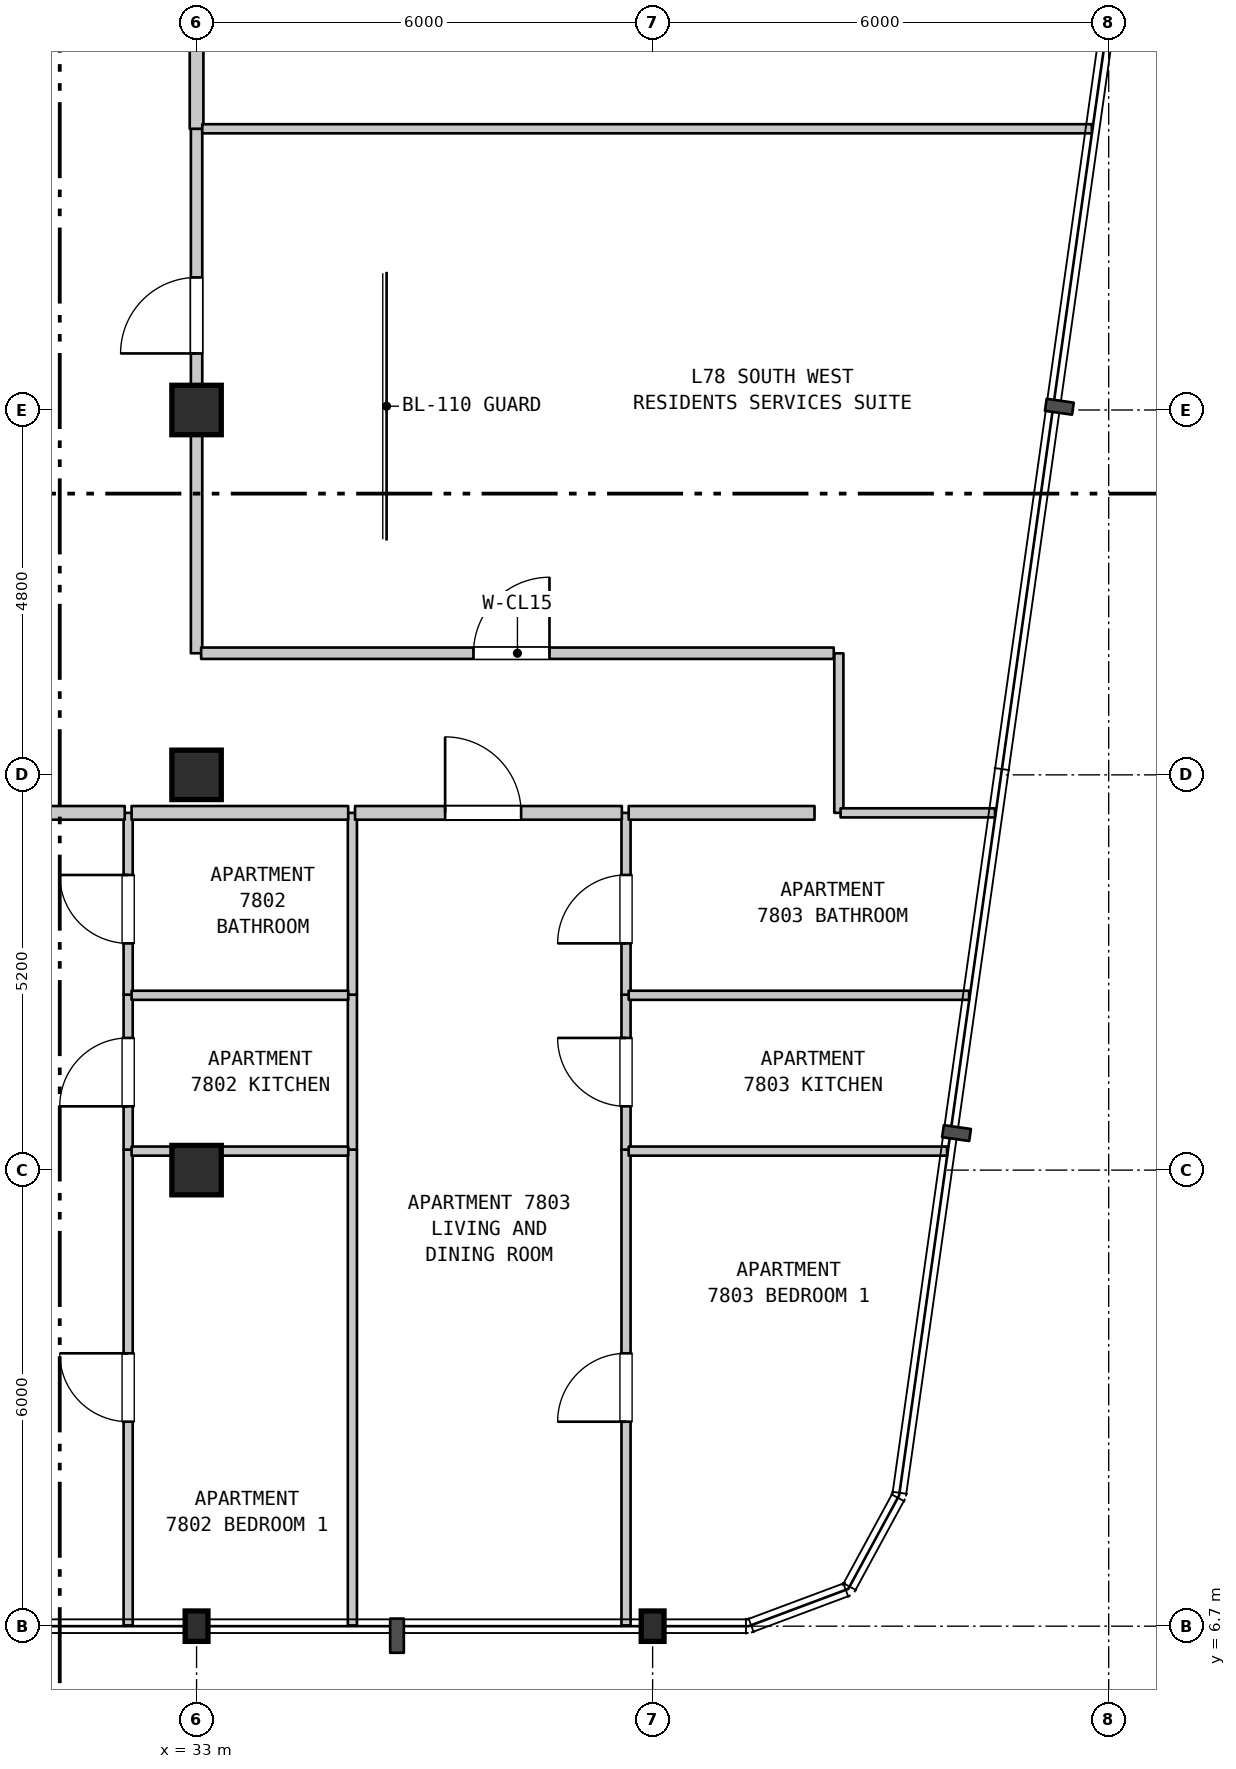
"""IFC4 building model, lengths in metres.
Left out: names, types, materials, properties, quantities, classifications, styles, units other than length and angle.
Written with IfcOpenShell. Run it as: python <this file> out.ifc"""

import sys

from ifc_helpers import new_model, si_unit, direction, frame, frame_2d, origin, origin_2d, place, context, subcontext, project, spatial, rectangle, i_section, extrude, element, fill, save


model = new_model("IFC4")
c1 = context("Model", 3, precision=1e-05, world=origin(), true_north=direction((0.0, 1.0)))
c2 = subcontext(c1, "Body", "Model", "MODEL_VIEW")
j1 = project(units=[si_unit("LENGTHUNIT", "METRE"), si_unit("PLANEANGLEUNIT", "RADIAN")], contexts=[c1])
p1 = place(None, origin())
s1 = spatial("IfcSite", under=j1, at=p1, CompositionType="ELEMENT")
p2 = place(p1, origin())
s2 = spatial("IfcBuilding", under=s1, at=p2, CompositionType="ELEMENT")
p3 = place(p2, frame((0.0, 0.0, 311.0)))
s3 = spatial("IfcBuildingStorey", under=s2, at=p3, CompositionType="ELEMENT", Elevation=311.0)
p4 = place(p3, frame((33.0, 6.7, 0.0), z_axis=(0.0, 0.0, 1.0), x_axis=(1.0, 0.0, 0.0)))
e1 = element("IfcColumn", 1, at=p4, inside=s3, PredefinedType="COLUMN", context=c2, shape_type="SweptSolid", body=[
    extrude(i_section(OverallWidth=0.3, OverallDepth=0.4, WebThickness=0.013, FlangeThickness=0.024, FilletRadius=0.027, at=origin_2d()), origin(), (0.0, 0.0, 1.0), 3.7),
])
for number, where, z_axis, x_axis in (
    (2, (33.0, 12.7, 0.0), (0.0, 0.0, 1.0), (1.0, 0.0, 0.0)),
    (3, (33.0, 17.9, 0.0), (0.0, 0.0, 1.0), (1.0, 0.0, 0.0)),
    (4, (33.0, 22.7, 0.0), (0.0, 0.0, 1.0), (1.0, 0.0, 0.0)),
):
    element("IfcColumn", number, at=place(p3, frame(where, z_axis=z_axis, x_axis=x_axis)), inside=s3, PredefinedType="COLUMN", context=c2, shape_type="SweptSolid", body=[
        extrude(rectangle(XDim=0.65, YDim=0.65, at=origin_2d()), origin(), (0.0, 0.0, 1.0), 3.7),
    ])
p5 = place(p3, frame((39.0, 6.7, 0.0), z_axis=(0.0, 0.0, 1.0), x_axis=(1.0, 0.0, 0.0)))
e5 = element("IfcColumn", 5, at=p5, inside=s3, PredefinedType="COLUMN", context=c2, shape_type="SweptSolid", body=[
    extrude(i_section(OverallWidth=0.3, OverallDepth=0.4, WebThickness=0.013, FlangeThickness=0.024, FilletRadius=0.027, at=origin_2d()), origin(), (0.0, 0.0, 1.0), 3.7),
])
p6 = place(p3, frame((32.1, 6.71, 0.0), z_axis=(0.0, 0.0, 1.0), x_axis=(0.0, 1.0, 0.0)))
e6 = element("IfcWall", 6, at=p6, inside=s3, PredefinedType="PARTITIONING", context=c2, shape_type="SweptSolid", body=[
    extrude(rectangle(XDim=6.26, YDim=0.12, at=frame_2d((3.13, 0.0))), origin(), (0.0, 0.0, 1.0), 3.28),
])
p7 = place(p6, frame((2.68, 0.0, 0.0)))
e7 = element("IfcOpeningElement", 7, at=p7, cuts=e6, PredefinedType="OPENING", context=c2, shape_type="SweptSolid", body=[
    extrude(rectangle(XDim=0.9, YDim=2.15, at=frame_2d((0.45, 1.075))), frame((0.0, 0.07, 0.0), z_axis=(0.0, -1.0, 0.0), x_axis=(1.0, 0.0, 0.0)), (0.0, 0.0, 1.0), 0.14),
])
p8 = place(p3, frame((32.1, 12.97, 0.0), z_axis=(0.0, 0.0, 1.0), x_axis=(0.0, 1.0, 0.0)))
e8 = element("IfcWall", 8, at=p8, inside=s3, PredefinedType="PARTITIONING", context=c2, shape_type="SweptSolid", body=[
    extrude(rectangle(XDim=2.038, YDim=0.12, at=frame_2d((1.019, 0.0))), origin(), (0.0, 0.0, 1.0), 3.28),
])
p9 = place(p8, frame((0.569, 0.0, 0.0)))
e9 = element("IfcOpeningElement", 9, at=p9, cuts=e8, PredefinedType="OPENING", context=c2, shape_type="SweptSolid", body=[
    extrude(rectangle(XDim=0.9, YDim=2.15, at=frame_2d((0.45, 1.075))), frame((0.0, 0.07, 0.0), z_axis=(0.0, -1.0, 0.0), x_axis=(1.0, 0.0, 0.0)), (0.0, 0.0, 1.0), 0.14),
])
p10 = place(p3, frame((32.1, 15.008, 0.0), z_axis=(0.0, 0.0, 1.0), x_axis=(0.0, 1.0, 0.0)))
e10 = element("IfcWall", 10, at=p10, inside=s3, PredefinedType="PARTITIONING", context=c2, shape_type="SweptSolid", body=[
    extrude(rectangle(XDim=2.392, YDim=0.12, at=frame_2d((1.196, 0.0))), origin(), (0.0, 0.0, 1.0), 3.28),
])
p11 = place(p10, frame((0.675, 0.0, 0.0)))
e11 = element("IfcOpeningElement", 11, at=p11, cuts=e10, PredefinedType="OPENING", context=c2, shape_type="SweptSolid", body=[
    extrude(rectangle(XDim=0.9, YDim=2.1, at=frame_2d((0.45, 1.05))), frame((0.0, 0.07, 0.0), z_axis=(0.0, -1.0, 0.0), x_axis=(1.0, 0.0, 0.0)), (0.0, 0.0, 1.0), 0.14),
])
p12 = place(p3, frame((33.0, 19.5, 0.0), z_axis=(0.0, 0.0, 1.0), x_axis=(0.0, 1.0, 0.0)))
e12 = element("IfcWall", 12, at=p12, inside=s3, PredefinedType="STANDARD", context=c2, shape_type="SweptSolid", body=[
    extrude(rectangle(XDim=6.9, YDim=0.15, at=frame_2d((3.45, 0.0))), origin(), (0.0, 0.0, 1.0), 2.99),
])
p13 = place(p12, frame((3.944, 0.0, 0.0)))
e13 = element("IfcOpeningElement", 13, at=p13, cuts=e12, PredefinedType="OPENING", context=c2, shape_type="SweptSolid", body=[
    extrude(rectangle(XDim=1.0, YDim=2.15, at=frame_2d((0.5, 1.075))), frame((0.0, 0.085, 0.0), z_axis=(0.0, -1.0, 0.0), x_axis=(1.0, 0.0, 0.0)), (0.0, 0.0, 1.0), 0.17),
])
p14 = place(p3, frame((33.0, 26.4, 0.0), z_axis=(0.0, 0.0, 1.0), x_axis=(0.0, 1.0, 0.0)))
e14 = element("IfcWall", 14, at=p14, inside=s3, PredefinedType="STANDARD", context=c2, shape_type="SweptSolid", body=[
    extrude(rectangle(XDim=1.5, YDim=0.18, at=frame_2d((0.75, 0.0))), origin(), (0.0, 0.0, 1.0), 2.99),
])
p15 = place(p3, frame((35.05, 6.71, 0.0), z_axis=(0.0, 0.0, 1.0), x_axis=(0.0, 1.0, 0.0)))
e15 = element("IfcWall", 15, at=p15, inside=s3, PredefinedType="PARTITIONING", context=c2, shape_type="SweptSolid", body=[
    extrude(rectangle(XDim=6.26, YDim=0.12, at=frame_2d((3.13, 0.0))), origin(), (0.0, 0.0, 1.0), 3.28),
])
p16 = place(p3, frame((35.05, 12.97, 0.0), z_axis=(0.0, 0.0, 1.0), x_axis=(0.0, 1.0, 0.0)))
e16 = element("IfcWall", 16, at=p16, inside=s3, PredefinedType="PARTITIONING", context=c2, shape_type="SweptSolid", body=[
    extrude(rectangle(XDim=2.038, YDim=0.12, at=frame_2d((1.019, 0.0))), origin(), (0.0, 0.0, 1.0), 3.28),
])
p17 = place(p3, frame((35.05, 15.008, 0.0), z_axis=(0.0, 0.0, 1.0), x_axis=(0.0, 1.0, 0.0)))
e17 = element("IfcWall", 17, at=p17, inside=s3, PredefinedType="PARTITIONING", context=c2, shape_type="SweptSolid", body=[
    extrude(rectangle(XDim=2.392, YDim=0.12, at=frame_2d((1.196, 0.0))), origin(), (0.0, 0.0, 1.0), 3.28),
])
p18 = place(p3, frame((38.65, 6.71, 0.0), z_axis=(0.0, 0.0, 1.0), x_axis=(0.0, 1.0, 0.0)))
e18 = element("IfcWall", 18, at=p18, inside=s3, PredefinedType="PARTITIONING", context=c2, shape_type="SweptSolid", body=[
    extrude(rectangle(XDim=6.26, YDim=0.12, at=frame_2d((3.13, 0.0))), origin(), (0.0, 0.0, 1.0), 3.28),
])
p19 = place(p18, frame((2.68, 0.0, 0.0)))
e19 = element("IfcOpeningElement", 19, at=p19, cuts=e18, PredefinedType="OPENING", context=c2, shape_type="SweptSolid", body=[
    extrude(rectangle(XDim=0.9, YDim=2.15, at=frame_2d((0.45, 1.075))), frame((0.0, 0.07, 0.0), z_axis=(0.0, -1.0, 0.0), x_axis=(1.0, 0.0, 0.0)), (0.0, 0.0, 1.0), 0.14),
])
p20 = place(p3, frame((38.65, 12.97, 0.0), z_axis=(0.0, 0.0, 1.0), x_axis=(0.0, 1.0, 0.0)))
e20 = element("IfcWall", 20, at=p20, inside=s3, PredefinedType="PARTITIONING", context=c2, shape_type="SweptSolid", body=[
    extrude(rectangle(XDim=2.038, YDim=0.12, at=frame_2d((1.019, 0.0))), origin(), (0.0, 0.0, 1.0), 3.28),
])
p21 = place(p20, frame((0.569, 0.0, 0.0)))
e21 = element("IfcOpeningElement", 21, at=p21, cuts=e20, PredefinedType="OPENING", context=c2, shape_type="SweptSolid", body=[
    extrude(rectangle(XDim=0.9, YDim=2.15, at=frame_2d((0.45, 1.075))), frame((0.0, 0.07, 0.0), z_axis=(0.0, -1.0, 0.0), x_axis=(1.0, 0.0, 0.0)), (0.0, 0.0, 1.0), 0.14),
])
p22 = place(p3, frame((38.65, 15.008, 0.0), z_axis=(0.0, 0.0, 1.0), x_axis=(0.0, 1.0, 0.0)))
e22 = element("IfcWall", 22, at=p22, inside=s3, PredefinedType="PARTITIONING", context=c2, shape_type="SweptSolid", body=[
    extrude(rectangle(XDim=2.392, YDim=0.12, at=frame_2d((1.196, 0.0))), origin(), (0.0, 0.0, 1.0), 3.28),
])
p23 = place(p22, frame((0.675, 0.0, 0.0)))
e23 = element("IfcOpeningElement", 23, at=p23, cuts=e22, PredefinedType="OPENING", context=c2, shape_type="SweptSolid", body=[
    extrude(rectangle(XDim=0.9, YDim=2.1, at=frame_2d((0.45, 1.05))), frame((0.0, 0.07, 0.0), z_axis=(0.0, -1.0, 0.0), x_axis=(1.0, 0.0, 0.0)), (0.0, 0.0, 1.0), 0.14),
])
p24 = place(p3, frame((41.45, 17.4, 0.0), z_axis=(0.0, 0.0, 1.0), x_axis=(0.0, 1.0, 0.0)))
e24 = element("IfcWall", 24, at=p24, inside=s3, PredefinedType="PARTITIONING", context=c2, shape_type="SweptSolid", body=[
    extrude(rectangle(XDim=2.099, YDim=0.12, at=frame_2d((1.05, 0.0))), origin(), (0.0, 0.0, 1.0), 3.28),
])
p25 = place(p3, frame((32.145, 12.95, 0.0), z_axis=(0.0, 0.0, 1.0), x_axis=(1.0, 0.0, 0.0)))
e25 = element("IfcWall", 25, at=p25, inside=s3, PredefinedType="PARTITIONING", context=c2, shape_type="SweptSolid", body=[
    extrude(rectangle(XDim=2.85, YDim=0.12, at=frame_2d((1.425, 0.0))), origin(), (0.0, 0.0, 1.0), 3.28),
])
p26 = place(p3, frame((38.685, 12.95, 0.0), z_axis=(0.0, 0.0, 1.0), x_axis=(1.0, 0.0, 0.0)))
e26 = element("IfcWall", 26, at=p26, inside=s3, PredefinedType="PARTITIONING", context=c2, shape_type="SweptSolid", body=[
    extrude(rectangle(XDim=4.189, YDim=0.12, at=frame_2d((2.094, 0.0))), origin(), (0.0, 0.0, 1.0), 3.28),
])
p27 = place(p3, frame((32.145, 15.0, 0.0), z_axis=(0.0, 0.0, 1.0), x_axis=(1.0, 0.0, 0.0)))
e27 = element("IfcWall", 27, at=p27, inside=s3, PredefinedType="PARTITIONING", context=c2, shape_type="SweptSolid", body=[
    extrude(rectangle(XDim=2.85, YDim=0.12, at=frame_2d((1.425, 0.0))), origin(), (0.0, 0.0, 1.0), 3.28),
])
p28 = place(p3, frame((38.685, 15.0, 0.0), z_axis=(0.0, 0.0, 1.0), x_axis=(1.0, 0.0, 0.0)))
e28 = element("IfcWall", 28, at=p28, inside=s3, PredefinedType="PARTITIONING", context=c2, shape_type="SweptSolid", body=[
    extrude(rectangle(XDim=4.479, YDim=0.12, at=frame_2d((2.24, 0.0))), origin(), (0.0, 0.0, 1.0), 3.28),
])
p29 = place(p3, frame((28.545, 17.4, 0.0), z_axis=(0.0, 0.0, 1.0), x_axis=(1.0, 0.0, 0.0)))
e29 = element("IfcWall", 29, at=p29, inside=s3, PredefinedType="STANDARD", context=c2, shape_type="SweptSolid", body=[
    extrude(rectangle(XDim=3.51, YDim=0.18, at=frame_2d((1.755, 0.0))), origin(), (0.0, 0.0, 1.0), 3.28),
])
p30 = place(p29, frame((1.185, 0.0, 0.0)))
e30 = element("IfcOpeningElement", 30, at=p30, cuts=e29, PredefinedType="OPENING", context=c2, shape_type="SweptSolid", body=[
    extrude(rectangle(XDim=1.0, YDim=2.15, at=frame_2d((0.5, 1.075))), frame((0.0, 0.1, 0.0), z_axis=(0.0, -1.0, 0.0), x_axis=(1.0, 0.0, 0.0)), (0.0, 0.0, 1.0), 0.2),
])
p31 = place(p3, frame((32.145, 17.4, 0.0), z_axis=(0.0, 0.0, 1.0), x_axis=(1.0, 0.0, 0.0)))
e31 = element("IfcWall", 31, at=p31, inside=s3, PredefinedType="STANDARD", context=c2, shape_type="SweptSolid", body=[
    extrude(rectangle(XDim=2.85, YDim=0.18, at=frame_2d((1.425, 0.0))), origin(), (0.0, 0.0, 1.0), 3.28),
])
p32 = place(p3, frame((35.085, 17.4, 0.0), z_axis=(0.0, 0.0, 1.0), x_axis=(1.0, 0.0, 0.0)))
e32 = element("IfcWall", 32, at=p32, inside=s3, PredefinedType="STANDARD", context=c2, shape_type="SweptSolid", body=[
    extrude(rectangle(XDim=3.51, YDim=0.18, at=frame_2d((1.755, 0.0))), origin(), (0.0, 0.0, 1.0), 3.28),
])
p33 = place(p32, frame((1.185, 0.0, 0.0)))
e33 = element("IfcOpeningElement", 33, at=p33, cuts=e32, PredefinedType="OPENING", context=c2, shape_type="SweptSolid", body=[
    extrude(rectangle(XDim=1.0, YDim=2.15, at=frame_2d((0.5, 1.075))), frame((0.0, 0.1, 0.0), z_axis=(0.0, -1.0, 0.0), x_axis=(1.0, 0.0, 0.0)), (0.0, 0.0, 1.0), 0.2),
])
p34 = place(p3, frame((38.685, 17.4, 0.0), z_axis=(0.0, 0.0, 1.0), x_axis=(1.0, 0.0, 0.0)))
e34 = element("IfcWall", 34, at=p34, inside=s3, PredefinedType="STANDARD", context=c2, shape_type="SweptSolid", body=[
    extrude(rectangle(XDim=2.445, YDim=0.18, at=frame_2d((1.222, 0.0))), origin(), (0.0, 0.0, 1.0), 3.28),
])
p35 = place(p3, frame((41.473, 17.4, 0.0), z_axis=(0.0, 0.0, 1.0), x_axis=(1.0, 0.0, 0.0)))
e35 = element("IfcWall", 35, at=p35, inside=s3, PredefinedType="PARTITIONING", context=c2, shape_type="SweptSolid", body=[
    extrude(rectangle(XDim=2.031, YDim=0.12, at=frame_2d((1.016, 0.0))), origin(), (0.0, 0.0, 1.0), 3.28),
])
p36 = place(p3, frame((33.06, 19.5, 0.0), z_axis=(0.0, 0.0, 1.0), x_axis=(1.0, 0.0, 0.0)))
e36 = element("IfcWall", 36, at=p36, inside=s3, PredefinedType="STANDARD", context=c2, shape_type="SweptSolid", body=[
    extrude(rectangle(XDim=8.323, YDim=0.15, at=frame_2d((4.162, 0.0))), origin(), (0.0, 0.0, 1.0), 3.28),
])
p37 = place(p36, frame((3.583, 0.0, 0.0)))
e37 = element("IfcOpeningElement", 37, at=p37, cuts=e36, PredefinedType="OPENING", context=c2, shape_type="SweptSolid", body=[
    extrude(rectangle(XDim=1.0, YDim=2.15, at=frame_2d((0.5, 1.075))), frame((0.0, 0.085, 0.0), z_axis=(0.0, -1.0, 0.0), x_axis=(1.0, 0.0, 0.0)), (0.0, 0.0, 1.0), 0.17),
])
p38 = place(p3, frame((33.075, 26.4, 0.0), z_axis=(0.0, 0.0, 1.0), x_axis=(1.0, 0.0, 0.0)))
e38 = element("IfcWall", 38, at=p38, inside=s3, PredefinedType="PARTITIONING", context=c2, shape_type="SweptSolid", body=[
    extrude(rectangle(XDim=11.703, YDim=0.12, at=frame_2d((5.852, 0.0))), origin(), (0.0, 0.0, 1.0), 3.28),
])
p39 = place(p7, origin())
e39 = element("IfcDoor", 39, at=p39, inside=s3, OperationType="SINGLE_SWING_RIGHT", PredefinedType="DOOR", context=c2, shape_type="SweptSolid", body=[
    extrude(rectangle(XDim=0.9, YDim=2.15, at=frame_2d((0.45, 1.075))), frame((0.0, 0.025, 0.0), z_axis=(0.0, -1.0, 0.0), x_axis=(1.0, 0.0, 0.0)), (0.0, 0.0, 1.0), 0.05),
])
fill(e7, e39)
p40 = place(p9, origin())
e40 = element("IfcDoor", 40, at=p40, inside=s3, OperationType="SINGLE_SWING_LEFT", PredefinedType="DOOR", context=c2, shape_type="SweptSolid", body=[
    extrude(rectangle(XDim=0.9, YDim=2.15, at=frame_2d((0.45, 1.075))), frame((0.0, 0.025, 0.0), z_axis=(0.0, -1.0, 0.0), x_axis=(1.0, 0.0, 0.0)), (0.0, 0.0, 1.0), 0.05),
])
fill(e9, e40)
p41 = place(p11, origin())
e41 = element("IfcDoor", 41, at=p41, inside=s3, OperationType="SINGLE_SWING_RIGHT", PredefinedType="DOOR", context=c2, shape_type="SweptSolid", body=[
    extrude(rectangle(XDim=0.9, YDim=2.1, at=frame_2d((0.45, 1.05))), frame((0.0, 0.025, 0.0), z_axis=(0.0, -1.0, 0.0), x_axis=(1.0, 0.0, 0.0)), (0.0, 0.0, 1.0), 0.05),
])
fill(e11, e41)
p42 = place(p13, origin())
e42 = element("IfcDoor", 42, at=p42, inside=s3, OperationType="SINGLE_SWING_LEFT", PredefinedType="DOOR", context=c2, shape_type="SweptSolid", body=[
    extrude(rectangle(XDim=1.0, YDim=2.15, at=frame_2d((0.5, 1.075))), frame((0.0, 0.025, 0.0), z_axis=(0.0, -1.0, 0.0), x_axis=(1.0, 0.0, 0.0)), (0.0, 0.0, 1.0), 0.05),
])
fill(e13, e42)
p43 = place(p19, origin())
e43 = element("IfcDoor", 43, at=p43, inside=s3, OperationType="SINGLE_SWING_LEFT", PredefinedType="DOOR", context=c2, shape_type="SweptSolid", body=[
    extrude(rectangle(XDim=0.9, YDim=2.15, at=frame_2d((0.45, 1.075))), frame((0.0, 0.025, 0.0), z_axis=(0.0, -1.0, 0.0), x_axis=(1.0, 0.0, 0.0)), (0.0, 0.0, 1.0), 0.05),
])
fill(e19, e43)
p44 = place(p21, origin())
e44 = element("IfcDoor", 44, at=p44, inside=s3, OperationType="SINGLE_SWING_RIGHT", PredefinedType="DOOR", context=c2, shape_type="SweptSolid", body=[
    extrude(rectangle(XDim=0.9, YDim=2.15, at=frame_2d((0.45, 1.075))), frame((0.0, 0.025, 0.0), z_axis=(0.0, -1.0, 0.0), x_axis=(1.0, 0.0, 0.0)), (0.0, 0.0, 1.0), 0.05),
])
fill(e21, e44)
p45 = place(p23, origin())
e45 = element("IfcDoor", 45, at=p45, inside=s3, OperationType="SINGLE_SWING_LEFT", PredefinedType="DOOR", context=c2, shape_type="SweptSolid", body=[
    extrude(rectangle(XDim=0.9, YDim=2.1, at=frame_2d((0.45, 1.05))), frame((0.0, 0.025, 0.0), z_axis=(0.0, -1.0, 0.0), x_axis=(1.0, 0.0, 0.0)), (0.0, 0.0, 1.0), 0.05),
])
fill(e23, e45)
p46 = place(p33, origin())
e46 = element("IfcDoor", 46, at=p46, inside=s3, OperationType="SINGLE_SWING_LEFT", PredefinedType="DOOR", context=c2, shape_type="SweptSolid", body=[
    extrude(rectangle(XDim=1.0, YDim=2.15, at=frame_2d((0.5, 1.075))), frame((0.0, 0.025, 0.0), z_axis=(0.0, -1.0, 0.0), x_axis=(1.0, 0.0, 0.0)), (0.0, 0.0, 1.0), 0.05),
])
fill(e33, e46)
p47 = place(p37, origin())
e47 = element("IfcDoor", 47, at=p47, inside=s3, OperationType="SINGLE_SWING_RIGHT", PredefinedType="DOOR", context=c2, shape_type="SweptSolid", body=[
    extrude(rectangle(XDim=1.0, YDim=2.15, at=frame_2d((0.5, 1.075))), frame((0.0, 0.025, 0.0), z_axis=(0.0, -1.0, 0.0), x_axis=(1.0, 0.0, 0.0)), (0.0, 0.0, 1.0), 0.05),
])
fill(e37, e47)
save(model, sys.argv[1])
